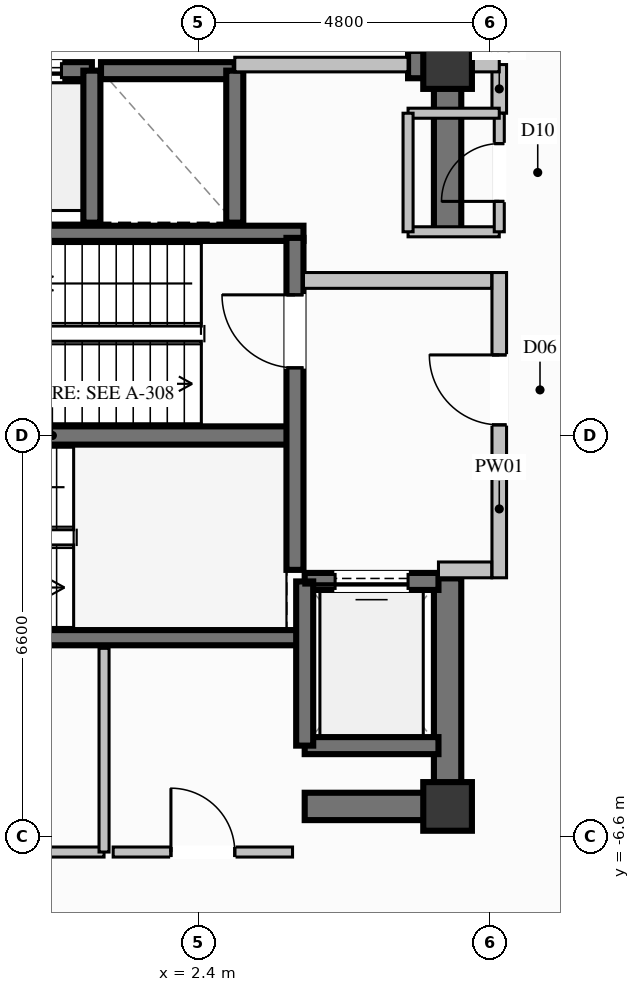
"""IFC4 building model, lengths in metres.
Left out: names, types, materials, properties, quantities, classifications, styles, units other than length and angle.
Written with IfcOpenShell. Run it as: python <this file> out.ifc"""

import sys

from ifc_helpers import new_model, si_unit, direction, frame, frame_2d, origin, origin_2d, place, context, subcontext, project, spatial, rectangle, extrude, element, fill, save


model = new_model("IFC4")
c1 = context("Model", 3, precision=1e-05, world=origin(), true_north=direction((0.0, 1.0)))
c2 = subcontext(c1, "Body", "Model", "MODEL_VIEW")
j1 = project(units=[si_unit("LENGTHUNIT", "METRE"), si_unit("PLANEANGLEUNIT", "RADIAN")], contexts=[c1])
p1 = place(None, origin())
s1 = spatial("IfcSite", under=j1, at=p1, CompositionType="ELEMENT")
p2 = place(p1, origin())
s2 = spatial("IfcBuilding", under=s1, at=p2, CompositionType="ELEMENT")
p3 = place(p2, frame((0.0, 0.0, 254.4)))
s3 = spatial("IfcBuildingStorey", under=s2, at=p3, CompositionType="ELEMENT", Elevation=254.4)
for number, where, z_axis, x_axis in (
    (1, (6.5, -6.1, 0.0), (0.0, 0.0, 1.0), (1.0, 0.0, 0.0)),
    (2, (6.5, 6.1, 0.0), (0.0, 0.0, 1.0), (1.0, 0.0, 0.0)),
):
    element("IfcColumn", number, at=place(p3, frame(where, z_axis=z_axis, x_axis=x_axis)), inside=s3, PredefinedType="COLUMN", context=c2, shape_type="SweptSolid", body=[
        extrude(rectangle(XDim=0.8, YDim=0.8, at=origin_2d()), origin(), (0.0, 0.0, 1.0), 3.8),
    ])
p4 = place(p3, frame((-3.99, 0.0, 0.0), z_axis=(0.0, 0.0, 1.0), x_axis=(1.0, 0.0, 0.0)))
e3 = element("IfcWall", 3, at=p4, inside=s3, PredefinedType="SHEAR", context=c2, shape_type="SweptSolid", body=[
    extrude(rectangle(XDim=7.98, YDim=0.3, at=frame_2d((3.99, 0.0))), origin(), (0.0, 0.0, 1.0), 3.8),
])
for number, where, z_axis, x_axis in (
    (4, (-4.13, -3.325, 0.0), (0.0, 0.0, 1.0), (1.0, 0.0, 0.0)),
    (5, (-4.13, 3.325, 0.0), (0.0, 0.0, 1.0), (1.0, 0.0, 0.0)),
):
    element("IfcWall", number, at=place(p3, frame(where, z_axis=z_axis, x_axis=x_axis)), inside=s3, PredefinedType="SOLIDWALL", context=c2, shape_type="SweptSolid", body=[
        extrude(rectangle(XDim=8.26, YDim=0.25, at=frame_2d((4.13, 0.0))), origin(), (0.0, 0.0, 1.0), 3.8),
    ])
p5 = place(p3, frame((4.15, -6.1, 0.0), z_axis=(0.0, 0.0, 1.0), x_axis=(1.0, 0.0, 0.0)))
e6 = element("IfcWall", 6, at=p5, inside=s3, PredefinedType="SHEAR", context=c2, shape_type="SweptSolid", body=[
    extrude(rectangle(XDim=2.125, YDim=0.45, at=frame_2d((1.062, 0.0))), origin(), (0.0, 0.0, 1.0), 3.8),
])
p6 = place(p3, frame((5.85, 6.1, 0.0), z_axis=(0.0, 0.0, 1.0), x_axis=(1.0, 0.0, 0.0)))
e7 = element("IfcWall", 7, at=p6, inside=s3, PredefinedType="SHEAR", context=c2, shape_type="SweptSolid", body=[
    extrude(rectangle(XDim=0.425, YDim=0.45, at=frame_2d((0.212, 0.0))), origin(), (0.0, 0.0, 1.0), 3.8),
])
p7 = place(p3, frame((6.5, -6.325, 0.0), z_axis=(0.0, 0.0, 1.0), x_axis=(0.0, 1.0, 0.0)))
e8 = element("IfcWall", 8, at=p7, inside=s3, PredefinedType="SHEAR", context=c2, shape_type="SweptSolid", body=[
    extrude(rectangle(XDim=3.975, YDim=0.45, at=frame_2d((1.987, 0.0))), origin(), (0.0, 0.0, 1.0), 3.8),
])
p8 = place(p3, frame((6.5, 3.35, 0.0), z_axis=(0.0, 0.0, 1.0), x_axis=(0.0, 1.0, 0.0)))
e9 = element("IfcWall", 9, at=p8, inside=s3, PredefinedType="SHEAR", context=c2, shape_type="SweptSolid", body=[
    extrude(rectangle(XDim=2.975, YDim=0.45, at=frame_2d((1.487, 0.0))), origin(), (0.0, 0.0, 1.0), 3.8),
])
p9 = place(p3, frame((0.65, 6.0, 0.0), z_axis=(0.0, 0.0, 1.0), x_axis=(-1.0, 0.0, 0.0)))
e10 = element("IfcWall", 10, at=p9, inside=s3, PredefinedType="SOLIDWALL", context=c2, shape_type="SweptSolid", body=[
    extrude(rectangle(XDim=2.1, YDim=0.28, at=frame_2d((1.05, 0.0))), origin(), (0.0, 0.0, 1.0), 3.57),
])
p10 = place(p9, frame((0.5, 0.0, 0.0)))
e11 = element("IfcOpeningElement", 11, at=p10, cuts=e10, PredefinedType="OPENING", context=c2, shape_type="SweptSolid", body=[
    extrude(rectangle(XDim=1.1, YDim=2.2, at=frame_2d((0.55, 1.1))), frame((0.0, 0.15, 0.0), z_axis=(0.0, -1.0, 0.0), x_axis=(1.0, 0.0, 0.0)), (0.0, 0.0, 1.0), 0.3),
])
p11 = place(p3, frame((0.65, 3.5, 0.0), z_axis=(0.0, 0.0, 1.0), x_axis=(0.0, 1.0, 0.0)))
e12 = element("IfcWall", 12, at=p11, inside=s3, PredefinedType="SOLIDWALL", context=c2, shape_type="SweptSolid", body=[
    extrude(rectangle(XDim=2.5, YDim=0.28, at=frame_2d((1.25, 0.0))), origin(), (0.0, 0.0, 1.0), 3.57),
])
p12 = place(p3, frame((3.0, 6.0, 0.0), z_axis=(0.0, 0.0, 1.0), x_axis=(-1.0, 0.0, 0.0)))
e13 = element("IfcWall", 13, at=p12, inside=s3, PredefinedType="SOLIDWALL", context=c2, shape_type="SweptSolid", body=[
    extrude(rectangle(XDim=2.2, YDim=0.28, at=frame_2d((1.1, 0.0))), origin(), (0.0, 0.0, 1.0), 3.57),
])
p13 = place(p3, frame((3.0, 3.5, 0.0), z_axis=(0.0, 0.0, 1.0), x_axis=(0.0, 1.0, 0.0)))
e14 = element("IfcWall", 14, at=p13, inside=s3, PredefinedType="SOLIDWALL", context=c2, shape_type="SweptSolid", body=[
    extrude(rectangle(XDim=2.5, YDim=0.28, at=frame_2d((1.25, 0.0))), origin(), (0.0, 0.0, 1.0), 3.57),
])
p14 = place(p3, frame((4.15, -5.1, 0.0), z_axis=(0.0, 0.0, 1.0), x_axis=(1.0, 0.0, 0.0)))
e15 = element("IfcWall", 15, at=p14, inside=s3, PredefinedType="SOLIDWALL", context=c2, shape_type="SweptSolid", body=[
    extrude(rectangle(XDim=2.2, YDim=0.28, at=frame_2d((1.1, 0.0))), origin(), (0.0, 0.0, 1.0), 3.57),
])
p15 = place(p3, frame((6.35, -2.4, 0.0), z_axis=(0.0, 0.0, 1.0), x_axis=(-1.0, 0.0, 0.0)))
e16 = element("IfcWall", 16, at=p15, inside=s3, PredefinedType="SOLIDWALL", context=c2, shape_type="SweptSolid", body=[
    extrude(rectangle(XDim=2.2, YDim=0.28, at=frame_2d((1.1, 0.0))), origin(), (0.0, 0.0, 1.0), 3.57),
])
p16 = place(p15, frame((0.5, 0.0, 0.0)))
e17 = element("IfcOpeningElement", 17, at=p16, cuts=e16, PredefinedType="OPENING", context=c2, shape_type="SweptSolid", body=[
    extrude(rectangle(XDim=1.2, YDim=2.2, at=frame_2d((0.6, 1.1))), frame((0.0, 0.15, 0.0), z_axis=(0.0, -1.0, 0.0), x_axis=(1.0, 0.0, 0.0)), (0.0, 0.0, 1.0), 0.3),
])
p17 = place(p3, frame((4.15, -2.4, 0.0), z_axis=(0.0, 0.0, 1.0), x_axis=(0.0, -1.0, 0.0)))
e18 = element("IfcWall", 18, at=p17, inside=s3, PredefinedType="SOLIDWALL", context=c2, shape_type="SweptSolid", body=[
    extrude(rectangle(XDim=2.7, YDim=0.28, at=frame_2d((1.35, 0.0))), origin(), (0.0, 0.0, 1.0), 3.57),
])
p18 = place(p3, frame((3.99, -2.21, 0.0), z_axis=(0.0, 0.0, 1.0), x_axis=(0.0, 1.0, 0.0)))
e19 = element("IfcWall", 19, at=p18, inside=s3, PredefinedType="SOLIDWALL", context=c2, shape_type="SweptSolid", body=[
    extrude(rectangle(XDim=5.46, YDim=0.28, at=frame_2d((2.73, 0.0))), origin(), (0.0, 0.0, 1.0), 3.57),
])
p19 = place(p18, frame((3.323, 0.0, 0.0)))
e20 = element("IfcOpeningElement", 20, at=p19, cuts=e19, PredefinedType="OPENING", context=c2, shape_type="SweptSolid", body=[
    extrude(rectangle(XDim=1.2, YDim=2.2, at=frame_2d((0.6, 1.1))), frame((0.0, 0.15, 0.0), z_axis=(0.0, -1.0, 0.0), x_axis=(1.0, 0.0, 0.0)), (0.0, 0.0, 1.0), 0.3),
])
p20 = place(p3, frame((7.35, -2.34, 0.0), z_axis=(0.0, 0.0, 1.0), x_axis=(0.0, 1.0, 0.0)))
e21 = element("IfcWall", 21, at=p20, inside=s3, PredefinedType="PARTITIONING", context=c2, shape_type="SweptSolid", body=[
    extrude(rectangle(XDim=5.02, YDim=0.24, at=frame_2d((2.51, 0.0))), origin(), (0.0, 0.0, 1.0), 2.655),
])
p21 = place(p20, frame((2.515, 0.0, 0.0)))
e22 = element("IfcOpeningElement", 22, at=p21, cuts=e21, PredefinedType="OPENING", context=c2, shape_type="SweptSolid", body=[
    extrude(rectangle(XDim=1.15, YDim=2.2, at=frame_2d((0.575, 1.1))), frame((0.0, 0.13, 0.0), z_axis=(0.0, -1.0, 0.0), x_axis=(1.0, 0.0, 0.0)), (0.0, 0.0, 1.0), 0.26),
])
p22 = place(p3, frame((6.35, -2.21, 0.0), z_axis=(0.0, 0.0, 1.0), x_axis=(1.0, 0.0, 0.0)))
e23 = element("IfcWall", 23, at=p22, inside=s3, PredefinedType="PARTITIONING", context=c2, shape_type="SweptSolid", body=[
    extrude(rectangle(XDim=0.875, YDim=0.26, at=frame_2d((0.438, 0.0))), origin(), (0.0, 0.0, 1.0), 3.57),
])
p23 = place(p3, frame((4.13, 2.55, 0.0), z_axis=(0.0, 0.0, 1.0), x_axis=(1.0, 0.0, 0.0)))
e24 = element("IfcWall", 24, at=p23, inside=s3, PredefinedType="PARTITIONING", context=c2, shape_type="SweptSolid", body=[
    extrude(rectangle(XDim=3.095, YDim=0.26, at=frame_2d((1.548, 0.0))), origin(), (0.0, 0.0, 1.0), 3.57),
])
p24 = place(p3, frame((3.0, 6.1, 0.0), z_axis=(0.0, 0.0, 1.0), x_axis=(1.0, 0.0, 0.0)))
e25 = element("IfcWall", 25, at=p24, inside=s3, PredefinedType="PARTITIONING", context=c2, shape_type="SweptSolid", body=[
    extrude(rectangle(XDim=2.85, YDim=0.24, at=frame_2d((1.425, 0.0))), origin(), (0.0, 0.0, 1.0), 2.655),
])
p25 = place(p3, frame((7.35, 5.3, 0.0), z_axis=(0.0, 0.0, 1.0), x_axis=(0.0, 1.0, 0.0)))
e26 = element("IfcWall", 26, at=p25, inside=s3, PredefinedType="PARTITIONING", context=c2, shape_type="SweptSolid", body=[
    extrude(rectangle(XDim=0.8, YDim=0.24, at=frame_2d((0.4, 0.0))), origin(), (0.0, 0.0, 1.0), 2.655),
])
p26 = place(p3, frame((6.5, 6.1, 0.0), z_axis=(0.0, 0.0, 1.0), x_axis=(1.0, 0.0, 0.0)))
e27 = element("IfcWall", 27, at=p26, inside=s3, PredefinedType="PARTITIONING", context=c2, shape_type="SweptSolid", body=[
    extrude(rectangle(XDim=0.85, YDim=0.24, at=frame_2d((0.425, 0.0))), origin(), (0.0, 0.0, 1.0), 3.011),
])
p27 = place(p3, frame((5.85, 3.35, 0.0), z_axis=(0.0, 0.0, 1.0), x_axis=(1.0, 0.0, 0.0)))
e28 = element("IfcWall", 28, at=p27, inside=s3, PredefinedType="PARTITIONING", context=c2, shape_type="SweptSolid", body=[
    extrude(rectangle(XDim=1.5, YDim=0.165, at=frame_2d((0.75, 0.0))), origin(), (0.0, 0.0, 1.0), 3.57),
])
p28 = place(p3, frame((7.35, 3.35, 0.0), z_axis=(0.0, 0.0, 1.0), x_axis=(0.0, 1.0, 0.0)))
e29 = element("IfcWall", 29, at=p28, inside=s3, PredefinedType="PARTITIONING", context=c2, shape_type="SweptSolid", body=[
    extrude(rectangle(XDim=1.95, YDim=0.165, at=frame_2d((0.975, 0.0))), origin(), (0.0, 0.0, 1.0), 3.57),
])
p29 = place(p28, frame((0.5, 0.0, 0.0)))
e30 = element("IfcOpeningElement", 30, at=p29, cuts=e29, PredefinedType="OPENING", context=c2, shape_type="SweptSolid", body=[
    extrude(rectangle(XDim=0.95, YDim=2.1, at=frame_2d((0.475, 1.05))), frame((0.0, 0.093, 0.0), z_axis=(0.0, -1.0, 0.0), x_axis=(1.0, 0.0, 0.0)), (0.0, 0.0, 1.0), 0.185),
])
p30 = place(p3, frame((7.35, 5.3, 0.0), z_axis=(0.0, 0.0, 1.0), x_axis=(-1.0, 0.0, 0.0)))
e31 = element("IfcWall", 31, at=p30, inside=s3, PredefinedType="PARTITIONING", context=c2, shape_type="SweptSolid", body=[
    extrude(rectangle(XDim=1.5, YDim=0.165, at=frame_2d((0.75, 0.0))), origin(), (0.0, 0.0, 1.0), 2.655),
])
p31 = place(p3, frame((5.85, 5.3, 0.0), z_axis=(0.0, 0.0, 1.0), x_axis=(0.0, -1.0, 0.0)))
e32 = element("IfcWall", 32, at=p31, inside=s3, PredefinedType="PARTITIONING", context=c2, shape_type="SweptSolid", body=[
    extrude(rectangle(XDim=1.95, YDim=0.165, at=frame_2d((0.975, 0.0))), origin(), (0.0, 0.0, 1.0), 2.655),
])
p32 = place(p3, frame((-5.7, -6.85, 0.0), z_axis=(0.0, 0.0, 1.0), x_axis=(1.0, 0.0, 0.0)))
e33 = element("IfcWall", 33, at=p32, inside=s3, PredefinedType="PARTITIONING", context=c2, shape_type="SweptSolid", body=[
    extrude(rectangle(XDim=6.55, YDim=0.165, at=frame_2d((3.275, 0.0))), origin(), (0.0, 0.0, 1.0), 2.655),
])
p33 = place(p32, frame((2.8, 0.0, 0.0)))
e34 = element("IfcOpeningElement", 34, at=p33, cuts=e33, PredefinedType="OPENING", context=c2, shape_type="SweptSolid", body=[
    extrude(rectangle(XDim=0.95, YDim=2.1, at=frame_2d((0.475, 1.05))), frame((0.0, 0.093, 0.0), z_axis=(0.0, -1.0, 0.0), x_axis=(1.0, 0.0, 0.0)), (0.0, 0.0, 1.0), 0.185),
])
p34 = place(p3, frame((0.85, -6.85, 0.0), z_axis=(0.0, 0.0, 1.0), x_axis=(0.0, 1.0, 0.0)))
e35 = element("IfcWall", 35, at=p34, inside=s3, PredefinedType="PARTITIONING", context=c2, shape_type="SweptSolid", body=[
    extrude(rectangle(XDim=3.35, YDim=0.165, at=frame_2d((1.675, 0.0))), origin(), (0.0, 0.0, 1.0), 3.57),
])
p35 = place(p3, frame((1.0, -6.85, 0.0), z_axis=(0.0, 0.0, 1.0), x_axis=(1.0, 0.0, 0.0)))
e36 = element("IfcWall", 36, at=p35, inside=s3, PredefinedType="PARTITIONING", context=c2, shape_type="SweptSolid", body=[
    extrude(rectangle(XDim=2.95, YDim=0.165, at=frame_2d((1.475, 0.0))), origin(), (0.0, 0.0, 1.0), 2.655),
])
p36 = place(p35, frame((0.95, 0.0, 0.0)))
e37 = element("IfcOpeningElement", 37, at=p36, cuts=e36, PredefinedType="OPENING", context=c2, shape_type="SweptSolid", body=[
    extrude(rectangle(XDim=1.05, YDim=2.15, at=frame_2d((0.525, 1.075))), frame((0.0, 0.093, 0.0), z_axis=(0.0, -1.0, 0.0), x_axis=(1.0, 0.0, 0.0)), (0.0, 0.0, 1.0), 0.185),
])
p37 = place(p10, origin())
e38 = element("IfcDoor", 38, at=p37, inside=s3, OperationType="SLIDING_TO_LEFT", PredefinedType="DOOR", context=c2, shape_type="SweptSolid", body=[
    extrude(rectangle(XDim=1.1, YDim=2.2, at=frame_2d((0.55, 1.1))), frame((0.0, 0.025, 0.0), z_axis=(0.0, -1.0, 0.0), x_axis=(1.0, 0.0, 0.0)), (0.0, 0.0, 1.0), 0.05),
])
fill(e11, e38)
p38 = place(p16, origin())
e39 = element("IfcDoor", 39, at=p38, inside=s3, OperationType="SLIDING_TO_LEFT", PredefinedType="DOOR", context=c2, shape_type="SweptSolid", body=[
    extrude(rectangle(XDim=1.2, YDim=2.2, at=frame_2d((0.6, 1.1))), frame((0.0, 0.025, 0.0), z_axis=(0.0, -1.0, 0.0), x_axis=(1.0, 0.0, 0.0)), (0.0, 0.0, 1.0), 0.05),
])
fill(e17, e39)
p39 = place(p19, origin())
e40 = element("IfcDoor", 40, at=p39, inside=s3, OperationType="SINGLE_SWING_RIGHT", PredefinedType="DOOR", context=c2, shape_type="SweptSolid", body=[
    extrude(rectangle(XDim=1.2, YDim=2.2, at=frame_2d((0.6, 1.1))), frame((0.0, 0.025, 0.0), z_axis=(0.0, -1.0, 0.0), x_axis=(1.0, 0.0, 0.0)), (0.0, 0.0, 1.0), 0.05),
])
fill(e20, e40)
p40 = place(p21, origin())
e41 = element("IfcDoor", 41, at=p40, inside=s3, OperationType="SINGLE_SWING_RIGHT", PredefinedType="DOOR", context=c2, shape_type="SweptSolid", body=[
    extrude(rectangle(XDim=1.15, YDim=2.2, at=frame_2d((0.575, 1.1))), frame((0.0, 0.025, 0.0), z_axis=(0.0, -1.0, 0.0), x_axis=(1.0, 0.0, 0.0)), (0.0, 0.0, 1.0), 0.05),
])
fill(e22, e41)
p41 = place(p29, origin())
e42 = element("IfcDoor", 42, at=p41, inside=s3, OperationType="SINGLE_SWING_LEFT", PredefinedType="DOOR", context=c2, shape_type="SweptSolid", body=[
    extrude(rectangle(XDim=0.95, YDim=2.1, at=frame_2d((0.475, 1.05))), frame((0.0, 0.025, 0.0), z_axis=(0.0, -1.0, 0.0), x_axis=(1.0, 0.0, 0.0)), (0.0, 0.0, 1.0), 0.05),
])
fill(e30, e42)
p42 = place(p36, origin())
e43 = element("IfcDoor", 43, at=p42, inside=s3, OperationType="SINGLE_SWING_LEFT", PredefinedType="DOOR", context=c2, shape_type="SweptSolid", body=[
    extrude(rectangle(XDim=1.05, YDim=2.15, at=frame_2d((0.525, 1.075))), frame((0.0, 0.025, 0.0), z_axis=(0.0, -1.0, 0.0), x_axis=(1.0, 0.0, 0.0)), (0.0, 0.0, 1.0), 0.05),
])
fill(e37, e43)
save(model, sys.argv[1])
